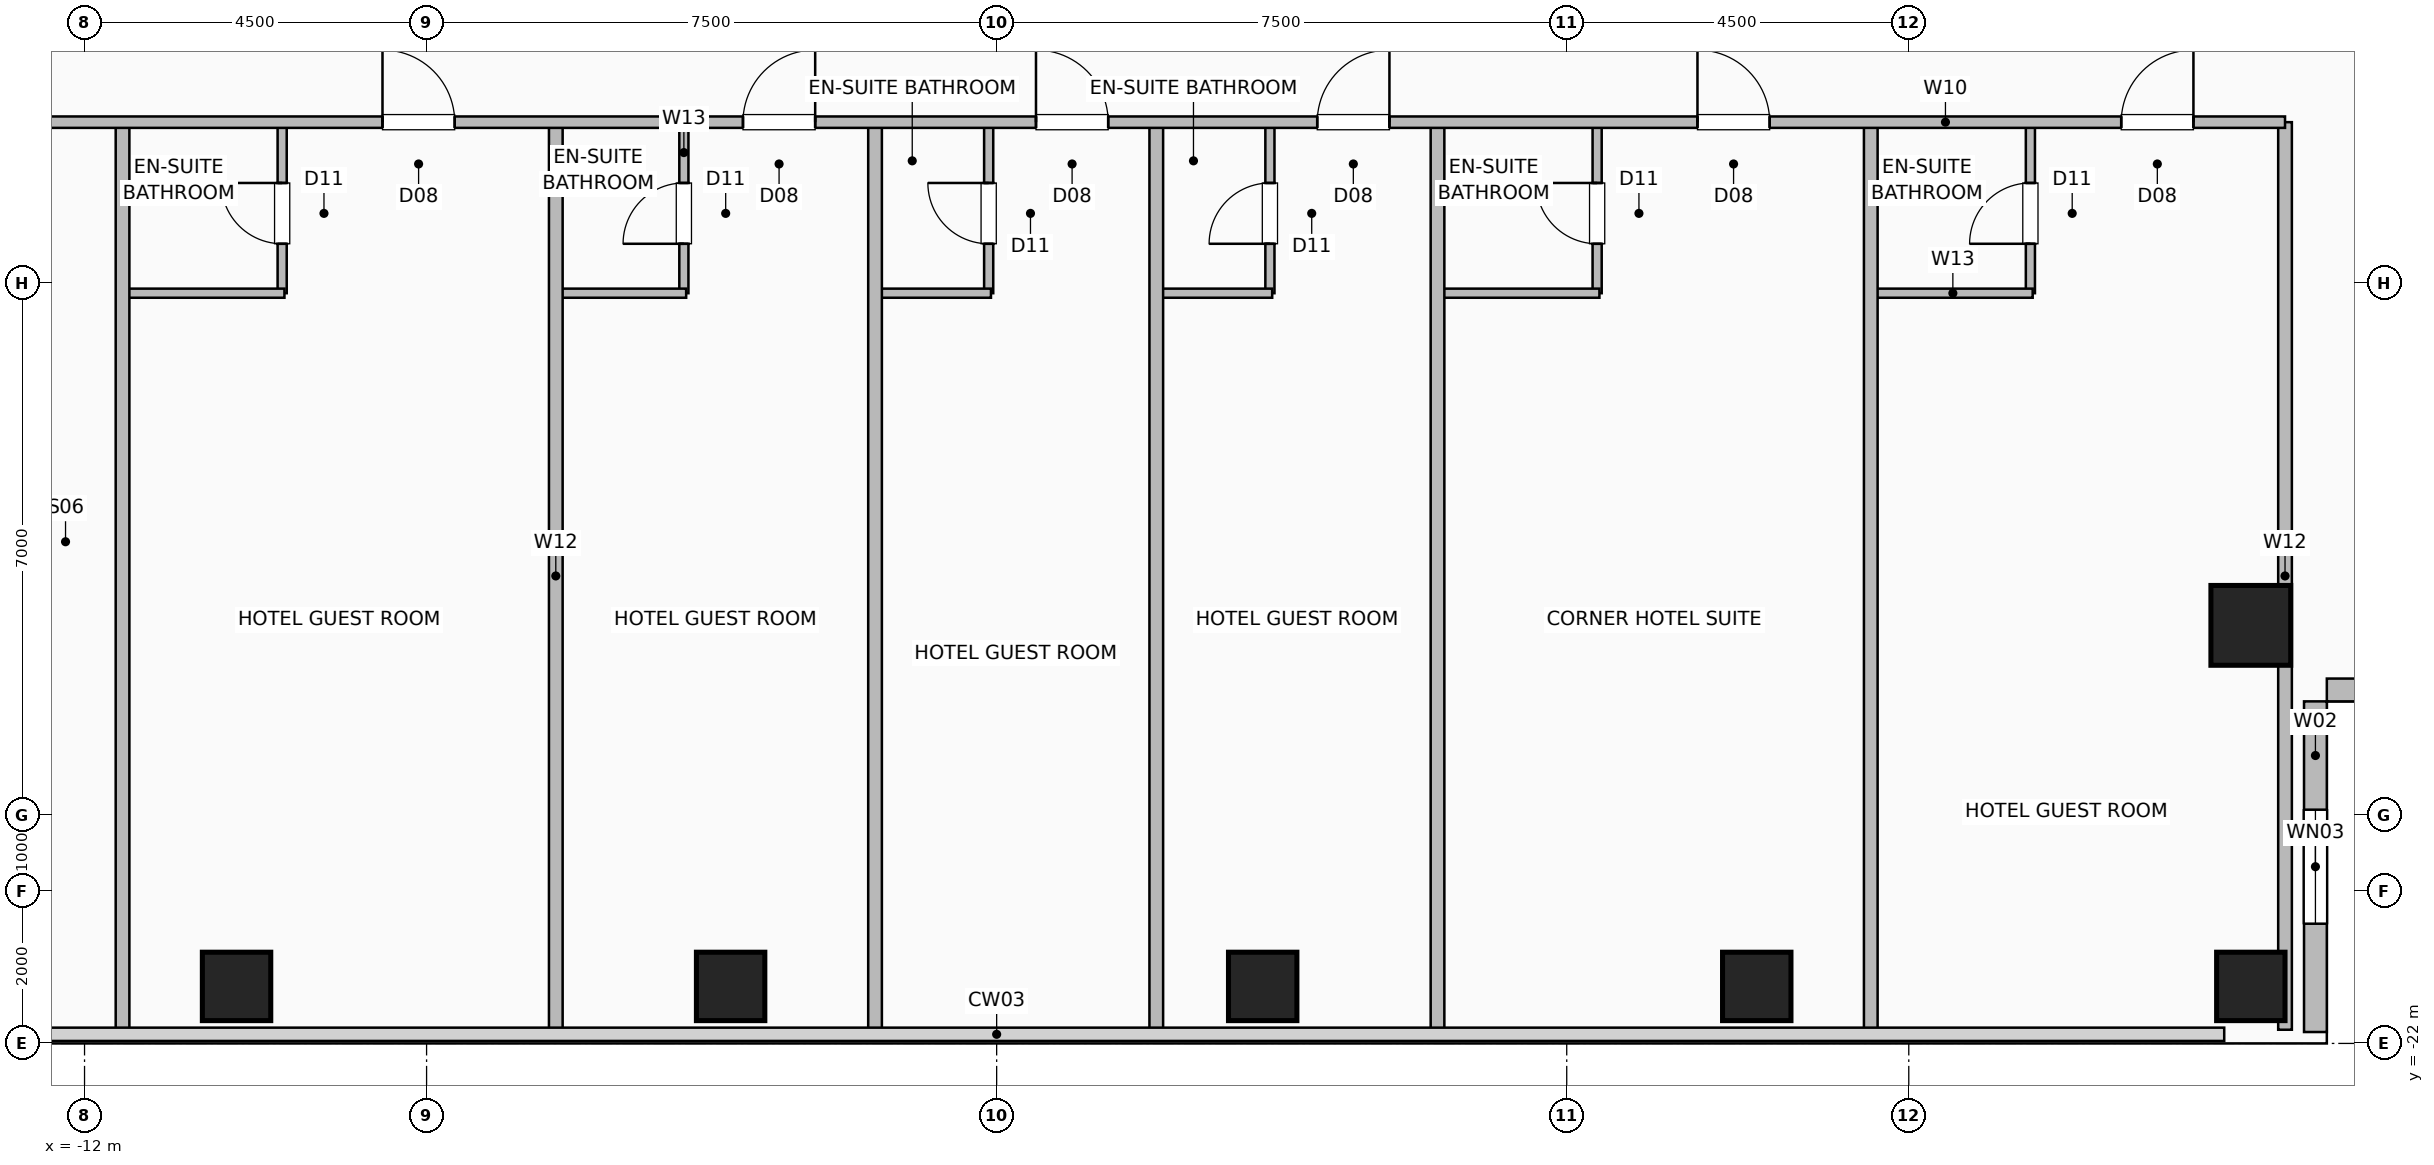
"""IFC4 building model, lengths in metres.
Left out: names, types, materials, properties, quantities, classifications, styles, units other than length and angle.
Written with IfcOpenShell. Run it as: python <this file> out.ifc"""

import sys

from ifc_helpers import new_model, si_unit, direction, frame, frame_2d, origin, origin_2d, place, context, subcontext, project, spatial, rectangle, hollow_rectangle, extrude, element, fill, save


model = new_model("IFC4")
c1 = context("Model", 3, precision=1e-05, world=origin(), true_north=direction((0.0, 1.0)))
c2 = subcontext(c1, "Body", "Model", "MODEL_VIEW")
j1 = project(units=[si_unit("LENGTHUNIT", "METRE"), si_unit("PLANEANGLEUNIT", "RADIAN")], contexts=[c1])
p1 = place(None, origin())
s1 = spatial("IfcSite", under=j1, at=p1, CompositionType="ELEMENT")
p2 = place(p1, origin())
s2 = spatial("IfcBuilding", under=s1, at=p2, CompositionType="ELEMENT")
p3 = place(p2, frame((0.0, 0.0, 151.6)))
s3 = spatial("IfcBuildingStorey", under=s2, at=p3, CompositionType="ELEMENT", Elevation=151.6)
for number, where, z_axis, x_axis in (
    (1, (-10.0, -21.25, 0.0), (0.0, 0.0, 1.0), (1.0, 0.0, 0.0)),
    (2, (-3.5, -21.25, 0.0), (0.0, 0.0, 1.0), (1.0, 0.0, 0.0)),
    (3, (3.5, -21.25, 0.0), (0.0, 0.0, 1.0), (1.0, 0.0, 0.0)),
    (4, (10.0, -21.25, 0.0), (0.0, 0.0, 1.0), (1.0, 0.0, 0.0)),
    (5, (16.5, -21.25, 0.0), (0.0, 0.0, 1.0), (1.0, 0.0, 0.0)),
):
    element("IfcColumn", number, at=place(p3, frame(where, z_axis=z_axis, x_axis=x_axis)), inside=s3, PredefinedType="COLUMN", context=c2, shape_type="SweptSolid", body=[
        extrude(hollow_rectangle(XDim=0.9, YDim=0.9, WallThickness=0.045, at=origin_2d()), origin(), (0.0, 0.0, 1.0), 3.6),
    ])
p4 = place(p3, frame((16.5, -16.5, 0.0), z_axis=(0.0, 0.0, 1.0), x_axis=(1.0, 0.0, 0.0)))
e6 = element("IfcColumn", 6, at=p4, inside=s3, PredefinedType="COLUMN", context=c2, shape_type="SweptSolid", body=[
    extrude(hollow_rectangle(XDim=1.05, YDim=1.05, WallThickness=0.05, at=origin_2d()), origin(), (0.0, 0.0, 1.0), 3.6),
])
p5 = place(p3, frame((17.35, -21.85, 0.0), z_axis=(0.0, 0.0, 1.0), x_axis=(0.0, 1.0, 0.0)))
e7 = element("IfcWall", 7, at=p5, inside=s3, PredefinedType="SOLIDWALL", context=c2, shape_type="SweptSolid", body=[
    extrude(rectangle(XDim=4.35, YDim=0.3, at=frame_2d((2.175, 0.0))), origin(), (0.0, 0.0, 1.0), 3.25),
])
p6 = place(p5, frame((1.425, 0.0, 0.9)))
e8 = element("IfcOpeningElement", 8, at=p6, cuts=e7, PredefinedType="OPENING", context=c2, shape_type="SweptSolid", body=[
    extrude(rectangle(XDim=1.5, YDim=1.8, at=frame_2d((0.75, 0.9))), frame((0.0, 0.16, 0.0), z_axis=(0.0, -1.0, 0.0), x_axis=(1.0, 0.0, 0.0)), (0.0, 0.0, 1.0), 0.32),
])
p7 = place(p3, frame((21.85, -17.35, 0.0), z_axis=(0.0, 0.0, 1.0), x_axis=(-1.0, 0.0, 0.0)))
e9 = element("IfcWall", 9, at=p7, inside=s3, PredefinedType="SOLIDWALL", context=c2, shape_type="SweptSolid", body=[
    extrude(rectangle(XDim=4.35, YDim=0.3, at=frame_2d((2.175, 0.0))), origin(), (0.0, 0.0, 1.0), 3.25),
])
p8 = place(p3, frame((-9.4, -12.13, 0.0), z_axis=(0.0, 0.0, 1.0), x_axis=(0.0, 1.0, 0.0)))
e10 = element("IfcWall", 10, at=p8, inside=s3, PredefinedType="PLUMBINGWALL", context=c2, shape_type="SweptSolid", body=[
    extrude(rectangle(XDim=2.25, YDim=0.12, at=frame_2d((1.125, 0.0))), origin(), (0.0, 0.0, 1.0), 3.25),
])
p9 = place(p8, frame((0.65, 0.0, 0.0)))
e11 = element("IfcOpeningElement", 11, at=p9, cuts=e10, PredefinedType="OPENING", context=c2, shape_type="SweptSolid", body=[
    extrude(rectangle(XDim=0.8, YDim=2.05, at=frame_2d((0.4, 1.025))), frame((0.0, 0.07, 0.0), z_axis=(0.0, -1.0, 0.0), x_axis=(1.0, 0.0, 0.0)), (0.0, 0.0, 1.0), 0.14),
])
p10 = place(p3, frame((-11.47, -12.13, 0.0), z_axis=(0.0, 0.0, 1.0), x_axis=(1.0, 0.0, 0.0)))
e12 = element("IfcWall", 12, at=p10, inside=s3, PredefinedType="PLUMBINGWALL", context=c2, shape_type="SweptSolid", body=[
    extrude(rectangle(XDim=2.1, YDim=0.12, at=frame_2d((1.05, 0.0))), origin(), (0.0, 0.0, 1.0), 3.25),
])
p11 = place(p3, frame((-4.115, -12.13, 0.0), z_axis=(0.0, 0.0, 1.0), x_axis=(0.0, 1.0, 0.0)))
e13 = element("IfcWall", 13, at=p11, inside=s3, PredefinedType="PLUMBINGWALL", context=c2, shape_type="SweptSolid", body=[
    extrude(rectangle(XDim=2.25, YDim=0.12, at=frame_2d((1.125, 0.0))), origin(), (0.0, 0.0, 1.0), 3.25),
])
p12 = place(p11, frame((0.65, 0.0, 0.0)))
e14 = element("IfcOpeningElement", 14, at=p12, cuts=e13, PredefinedType="OPENING", context=c2, shape_type="SweptSolid", body=[
    extrude(rectangle(XDim=0.8, YDim=2.05, at=frame_2d((0.4, 1.025))), frame((0.0, 0.07, 0.0), z_axis=(0.0, -1.0, 0.0), x_axis=(1.0, 0.0, 0.0)), (0.0, 0.0, 1.0), 0.14),
])
p13 = place(p3, frame((-5.77, -12.13, 0.0), z_axis=(0.0, 0.0, 1.0), x_axis=(1.0, 0.0, 0.0)))
e15 = element("IfcWall", 15, at=p13, inside=s3, PredefinedType="PLUMBINGWALL", context=c2, shape_type="SweptSolid", body=[
    extrude(rectangle(XDim=1.685, YDim=0.12, at=frame_2d((0.843, 0.0))), origin(), (0.0, 0.0, 1.0), 3.25),
])
p14 = place(p3, frame((-0.105, -12.13, 0.0), z_axis=(0.0, 0.0, 1.0), x_axis=(0.0, 1.0, 0.0)))
e16 = element("IfcWall", 16, at=p14, inside=s3, PredefinedType="PLUMBINGWALL", context=c2, shape_type="SweptSolid", body=[
    extrude(rectangle(XDim=2.25, YDim=0.12, at=frame_2d((1.125, 0.0))), origin(), (0.0, 0.0, 1.0), 3.25),
])
p15 = place(p14, frame((0.65, 0.0, 0.0)))
e17 = element("IfcOpeningElement", 17, at=p15, cuts=e16, PredefinedType="OPENING", context=c2, shape_type="SweptSolid", body=[
    extrude(rectangle(XDim=0.8, YDim=2.05, at=frame_2d((0.4, 1.025))), frame((0.0, 0.07, 0.0), z_axis=(0.0, -1.0, 0.0), x_axis=(1.0, 0.0, 0.0)), (0.0, 0.0, 1.0), 0.14),
])
p16 = place(p3, frame((-1.57, -12.13, 0.0), z_axis=(0.0, 0.0, 1.0), x_axis=(1.0, 0.0, 0.0)))
e18 = element("IfcWall", 18, at=p16, inside=s3, PredefinedType="PLUMBINGWALL", context=c2, shape_type="SweptSolid", body=[
    extrude(rectangle(XDim=1.495, YDim=0.12, at=frame_2d((0.748, 0.0))), origin(), (0.0, 0.0, 1.0), 3.25),
])
p17 = place(p3, frame((3.595, -12.13, 0.0), z_axis=(0.0, 0.0, 1.0), x_axis=(0.0, 1.0, 0.0)))
e19 = element("IfcWall", 19, at=p17, inside=s3, PredefinedType="PLUMBINGWALL", context=c2, shape_type="SweptSolid", body=[
    extrude(rectangle(XDim=2.25, YDim=0.12, at=frame_2d((1.125, 0.0))), origin(), (0.0, 0.0, 1.0), 2.608),
])
p18 = place(p17, frame((0.65, 0.0, 0.0)))
e20 = element("IfcOpeningElement", 20, at=p18, cuts=e19, PredefinedType="OPENING", context=c2, shape_type="SweptSolid", body=[
    extrude(rectangle(XDim=0.8, YDim=2.05, at=frame_2d((0.4, 1.025))), frame((0.0, 0.07, 0.0), z_axis=(0.0, -1.0, 0.0), x_axis=(1.0, 0.0, 0.0)), (0.0, 0.0, 1.0), 0.14),
])
p19 = place(p3, frame((2.13, -12.13, 0.0), z_axis=(0.0, 0.0, 1.0), x_axis=(1.0, 0.0, 0.0)))
e21 = element("IfcWall", 21, at=p19, inside=s3, PredefinedType="PLUMBINGWALL", context=c2, shape_type="SweptSolid", body=[
    extrude(rectangle(XDim=1.495, YDim=0.12, at=frame_2d((0.748, 0.0))), origin(), (0.0, 0.0, 1.0), 3.25),
])
p20 = place(p3, frame((7.9, -12.13, 0.0), z_axis=(0.0, 0.0, 1.0), x_axis=(0.0, 1.0, 0.0)))
e22 = element("IfcWall", 22, at=p20, inside=s3, PredefinedType="PLUMBINGWALL", context=c2, shape_type="SweptSolid", body=[
    extrude(rectangle(XDim=2.25, YDim=0.12, at=frame_2d((1.125, 0.0))), origin(), (0.0, 0.0, 1.0), 3.25),
])
p21 = place(p20, frame((0.65, 0.0, 0.0)))
e23 = element("IfcOpeningElement", 23, at=p21, cuts=e22, PredefinedType="OPENING", context=c2, shape_type="SweptSolid", body=[
    extrude(rectangle(XDim=0.8, YDim=2.05, at=frame_2d((0.4, 1.025))), frame((0.0, 0.07, 0.0), z_axis=(0.0, -1.0, 0.0), x_axis=(1.0, 0.0, 0.0)), (0.0, 0.0, 1.0), 0.14),
])
p22 = place(p3, frame((5.83, -12.13, 0.0), z_axis=(0.0, 0.0, 1.0), x_axis=(1.0, 0.0, 0.0)))
e24 = element("IfcWall", 24, at=p22, inside=s3, PredefinedType="PLUMBINGWALL", context=c2, shape_type="SweptSolid", body=[
    extrude(rectangle(XDim=2.1, YDim=0.12, at=frame_2d((1.05, 0.0))), origin(), (0.0, 0.0, 1.0), 3.25),
])
p23 = place(p3, frame((13.6, -12.13, 0.0), z_axis=(0.0, 0.0, 1.0), x_axis=(0.0, 1.0, 0.0)))
e25 = element("IfcWall", 25, at=p23, inside=s3, PredefinedType="PLUMBINGWALL", context=c2, shape_type="SweptSolid", body=[
    extrude(rectangle(XDim=2.25, YDim=0.12, at=frame_2d((1.125, 0.0))), origin(), (0.0, 0.0, 1.0), 3.25),
])
p24 = place(p23, frame((0.65, 0.0, 0.0)))
e26 = element("IfcOpeningElement", 26, at=p24, cuts=e25, PredefinedType="OPENING", context=c2, shape_type="SweptSolid", body=[
    extrude(rectangle(XDim=0.8, YDim=2.05, at=frame_2d((0.4, 1.025))), frame((0.0, 0.07, 0.0), z_axis=(0.0, -1.0, 0.0), x_axis=(1.0, 0.0, 0.0)), (0.0, 0.0, 1.0), 0.14),
])
p25 = place(p3, frame((11.53, -12.13, 0.0), z_axis=(0.0, 0.0, 1.0), x_axis=(1.0, 0.0, 0.0)))
e27 = element("IfcWall", 27, at=p25, inside=s3, PredefinedType="PLUMBINGWALL", context=c2, shape_type="SweptSolid", body=[
    extrude(rectangle(XDim=2.1, YDim=0.12, at=frame_2d((1.05, 0.0))), origin(), (0.0, 0.0, 1.0), 3.25),
])
for number, where, z_axis, x_axis in (
    (28, (-11.5, -21.82, 0.0), (0.0, 0.0, 1.0), (0.0, 1.0, 0.0)),
    (29, (-5.8, -21.82, 0.0), (0.0, 0.0, 1.0), (0.0, 1.0, 0.0)),
    (30, (-1.6, -21.82, 0.0), (0.0, 0.0, 1.0), (0.0, 1.0, 0.0)),
    (31, (2.1, -21.82, 0.0), (0.0, 0.0, 1.0), (0.0, 1.0, 0.0)),
    (32, (5.8, -21.82, 0.0), (0.0, 0.0, 1.0), (0.0, 1.0, 0.0)),
    (33, (11.5, -21.82, 0.0), (0.0, 0.0, 1.0), (0.0, 1.0, 0.0)),
    (34, (16.95, -21.82, 0.0), (0.0, 0.0, 1.0), (0.0, 1.0, 0.0)),
):
    element("IfcWall", number, at=place(p3, frame(where, z_axis=z_axis, x_axis=x_axis)), inside=s3, PredefinedType="PARTITIONING", context=c2, shape_type="SweptSolid", body=[
        extrude(rectangle(XDim=11.94, YDim=0.18, at=frame_2d((5.97, 0.0))), origin(), (0.0, 0.0, 1.0), 3.25),
    ])
p26 = place(p3, frame((-16.95, -9.88, 0.0), z_axis=(0.0, 0.0, 1.0), x_axis=(1.0, 0.0, 0.0)))
e35 = element("IfcWall", 35, at=p26, inside=s3, PredefinedType="PARTITIONING", context=c2, shape_type="SweptSolid", body=[
    extrude(rectangle(XDim=33.9, YDim=0.15, at=frame_2d((16.95, 0.0))), origin(), (0.0, 0.0, 1.0), 3.25),
])
p27 = place(p26, frame((3.295, 0.0, 0.0)))
e36 = element("IfcOpeningElement", 36, at=p27, cuts=e35, PredefinedType="OPENING", context=c2, shape_type="SweptSolid", body=[
    extrude(rectangle(XDim=0.95, YDim=2.08, at=frame_2d((0.475, 1.04))), frame((0.0, 0.085, 0.0), z_axis=(0.0, -1.0, 0.0), x_axis=(1.0, 0.0, 0.0)), (0.0, 0.0, 1.0), 0.17),
])
p28 = place(p26, frame((8.87, 0.0, 0.0)))
e37 = element("IfcOpeningElement", 37, at=p28, cuts=e35, PredefinedType="OPENING", context=c2, shape_type="SweptSolid", body=[
    extrude(rectangle(XDim=0.95, YDim=2.08, at=frame_2d((0.475, 1.04))), frame((0.0, 0.085, 0.0), z_axis=(0.0, -1.0, 0.0), x_axis=(1.0, 0.0, 0.0)), (0.0, 0.0, 1.0), 0.17),
])
p29 = place(p26, frame((13.613, 0.0, 0.0)))
e38 = element("IfcOpeningElement", 38, at=p29, cuts=e35, PredefinedType="OPENING", context=c2, shape_type="SweptSolid", body=[
    extrude(rectangle(XDim=0.95, YDim=2.08, at=frame_2d((0.475, 1.04))), frame((0.0, 0.085, 0.0), z_axis=(0.0, -1.0, 0.0), x_axis=(1.0, 0.0, 0.0)), (0.0, 0.0, 1.0), 0.17),
])
p30 = place(p26, frame((17.468, 0.0, 0.0)))
e39 = element("IfcOpeningElement", 39, at=p30, cuts=e35, PredefinedType="OPENING", context=c2, shape_type="SweptSolid", body=[
    extrude(rectangle(XDim=0.95, YDim=2.08, at=frame_2d((0.475, 1.04))), frame((0.0, 0.085, 0.0), z_axis=(0.0, -1.0, 0.0), x_axis=(1.0, 0.0, 0.0)), (0.0, 0.0, 1.0), 0.17),
])
p31 = place(p26, frame((21.167, 0.0, 0.0)))
e40 = element("IfcOpeningElement", 40, at=p31, cuts=e35, PredefinedType="OPENING", context=c2, shape_type="SweptSolid", body=[
    extrude(rectangle(XDim=0.95, YDim=2.08, at=frame_2d((0.475, 1.04))), frame((0.0, 0.085, 0.0), z_axis=(0.0, -1.0, 0.0), x_axis=(1.0, 0.0, 0.0)), (0.0, 0.0, 1.0), 0.17),
])
p32 = place(p26, frame((26.17, 0.0, 0.0)))
e41 = element("IfcOpeningElement", 41, at=p32, cuts=e35, PredefinedType="OPENING", context=c2, shape_type="SweptSolid", body=[
    extrude(rectangle(XDim=0.95, YDim=2.08, at=frame_2d((0.475, 1.04))), frame((0.0, 0.085, 0.0), z_axis=(0.0, -1.0, 0.0), x_axis=(1.0, 0.0, 0.0)), (0.0, 0.0, 1.0), 0.17),
])
p33 = place(p26, frame((31.745, 0.0, 0.0)))
e42 = element("IfcOpeningElement", 42, at=p33, cuts=e35, PredefinedType="OPENING", context=c2, shape_type="SweptSolid", body=[
    extrude(rectangle(XDim=0.95, YDim=2.08, at=frame_2d((0.475, 1.04))), frame((0.0, 0.085, 0.0), z_axis=(0.0, -1.0, 0.0), x_axis=(1.0, 0.0, 0.0)), (0.0, 0.0, 1.0), 0.17),
])
p34 = place(p6, origin())
e43 = element("IfcWindow", 43, at=p34, inside=s3, PartitioningType="SINGLE_PANEL", PredefinedType="WINDOW", context=c2, shape_type="SweptSolid", body=[
    extrude(rectangle(XDim=1.5, YDim=1.8, at=frame_2d((0.75, 0.9))), frame((0.0, 0.03, 0.0), z_axis=(0.0, -1.0, 0.0), x_axis=(1.0, 0.0, 0.0)), (0.0, 0.0, 1.0), 0.06),
])
fill(e8, e43)
p35 = place(p9, origin())
e44 = element("IfcDoor", 44, at=p35, inside=s3, OperationType="SINGLE_SWING_RIGHT", PredefinedType="DOOR", context=c2, shape_type="SweptSolid", body=[
    extrude(rectangle(XDim=0.8, YDim=2.05, at=frame_2d((0.4, 1.025))), frame((0.0, 0.025, 0.0), z_axis=(0.0, -1.0, 0.0), x_axis=(1.0, 0.0, 0.0)), (0.0, 0.0, 1.0), 0.05),
])
fill(e11, e44)
p36 = place(p12, origin())
e45 = element("IfcDoor", 45, at=p36, inside=s3, OperationType="SINGLE_SWING_LEFT", PredefinedType="DOOR", context=c2, shape_type="SweptSolid", body=[
    extrude(rectangle(XDim=0.8, YDim=2.05, at=frame_2d((0.4, 1.025))), frame((0.0, 0.025, 0.0), z_axis=(0.0, -1.0, 0.0), x_axis=(1.0, 0.0, 0.0)), (0.0, 0.0, 1.0), 0.05),
])
fill(e14, e45)
p37 = place(p15, origin())
e46 = element("IfcDoor", 46, at=p37, inside=s3, OperationType="SINGLE_SWING_RIGHT", PredefinedType="DOOR", context=c2, shape_type="SweptSolid", body=[
    extrude(rectangle(XDim=0.8, YDim=2.05, at=frame_2d((0.4, 1.025))), frame((0.0, 0.025, 0.0), z_axis=(0.0, -1.0, 0.0), x_axis=(1.0, 0.0, 0.0)), (0.0, 0.0, 1.0), 0.05),
])
fill(e17, e46)
p38 = place(p18, origin())
e47 = element("IfcDoor", 47, at=p38, inside=s3, OperationType="SINGLE_SWING_LEFT", PredefinedType="DOOR", context=c2, shape_type="SweptSolid", body=[
    extrude(rectangle(XDim=0.8, YDim=2.05, at=frame_2d((0.4, 1.025))), frame((0.0, 0.025, 0.0), z_axis=(0.0, -1.0, 0.0), x_axis=(1.0, 0.0, 0.0)), (0.0, 0.0, 1.0), 0.05),
])
fill(e20, e47)
p39 = place(p21, origin())
e48 = element("IfcDoor", 48, at=p39, inside=s3, OperationType="SINGLE_SWING_RIGHT", PredefinedType="DOOR", context=c2, shape_type="SweptSolid", body=[
    extrude(rectangle(XDim=0.8, YDim=2.05, at=frame_2d((0.4, 1.025))), frame((0.0, 0.025, 0.0), z_axis=(0.0, -1.0, 0.0), x_axis=(1.0, 0.0, 0.0)), (0.0, 0.0, 1.0), 0.05),
])
fill(e23, e48)
p40 = place(p24, origin())
e49 = element("IfcDoor", 49, at=p40, inside=s3, OperationType="SINGLE_SWING_LEFT", PredefinedType="DOOR", context=c2, shape_type="SweptSolid", body=[
    extrude(rectangle(XDim=0.8, YDim=2.05, at=frame_2d((0.4, 1.025))), frame((0.0, 0.025, 0.0), z_axis=(0.0, -1.0, 0.0), x_axis=(1.0, 0.0, 0.0)), (0.0, 0.0, 1.0), 0.05),
])
fill(e26, e49)
p41 = place(p28, origin())
e50 = element("IfcDoor", 50, at=p41, inside=s3, OperationType="SINGLE_SWING_LEFT", PredefinedType="DOOR", context=c2, shape_type="SweptSolid", body=[
    extrude(rectangle(XDim=0.95, YDim=2.08, at=frame_2d((0.475, 1.04))), frame((0.0, 0.025, 0.0), z_axis=(0.0, -1.0, 0.0), x_axis=(1.0, 0.0, 0.0)), (0.0, 0.0, 1.0), 0.05),
])
fill(e37, e50)
p42 = place(p29, origin())
e51 = element("IfcDoor", 51, at=p42, inside=s3, OperationType="SINGLE_SWING_RIGHT", PredefinedType="DOOR", context=c2, shape_type="SweptSolid", body=[
    extrude(rectangle(XDim=0.95, YDim=2.08, at=frame_2d((0.475, 1.04))), frame((0.0, 0.025, 0.0), z_axis=(0.0, -1.0, 0.0), x_axis=(1.0, 0.0, 0.0)), (0.0, 0.0, 1.0), 0.05),
])
fill(e38, e51)
p43 = place(p30, origin())
e52 = element("IfcDoor", 52, at=p43, inside=s3, OperationType="SINGLE_SWING_LEFT", PredefinedType="DOOR", context=c2, shape_type="SweptSolid", body=[
    extrude(rectangle(XDim=0.95, YDim=2.08, at=frame_2d((0.475, 1.04))), frame((0.0, 0.025, 0.0), z_axis=(0.0, -1.0, 0.0), x_axis=(1.0, 0.0, 0.0)), (0.0, 0.0, 1.0), 0.05),
])
fill(e39, e52)
p44 = place(p31, origin())
e53 = element("IfcDoor", 53, at=p44, inside=s3, OperationType="SINGLE_SWING_RIGHT", PredefinedType="DOOR", context=c2, shape_type="SweptSolid", body=[
    extrude(rectangle(XDim=0.95, YDim=2.08, at=frame_2d((0.475, 1.04))), frame((0.0, 0.025, 0.0), z_axis=(0.0, -1.0, 0.0), x_axis=(1.0, 0.0, 0.0)), (0.0, 0.0, 1.0), 0.05),
])
fill(e40, e53)
p45 = place(p32, origin())
e54 = element("IfcDoor", 54, at=p45, inside=s3, OperationType="SINGLE_SWING_LEFT", PredefinedType="DOOR", context=c2, shape_type="SweptSolid", body=[
    extrude(rectangle(XDim=0.95, YDim=2.08, at=frame_2d((0.475, 1.04))), frame((0.0, 0.025, 0.0), z_axis=(0.0, -1.0, 0.0), x_axis=(1.0, 0.0, 0.0)), (0.0, 0.0, 1.0), 0.05),
])
fill(e41, e54)
p46 = place(p33, origin())
e55 = element("IfcDoor", 55, at=p46, inside=s3, OperationType="SINGLE_SWING_RIGHT", PredefinedType="DOOR", context=c2, shape_type="SweptSolid", body=[
    extrude(rectangle(XDim=0.95, YDim=2.08, at=frame_2d((0.475, 1.04))), frame((0.0, 0.025, 0.0), z_axis=(0.0, -1.0, 0.0), x_axis=(1.0, 0.0, 0.0)), (0.0, 0.0, 1.0), 0.05),
])
fill(e42, e55)
save(model, sys.argv[1])
